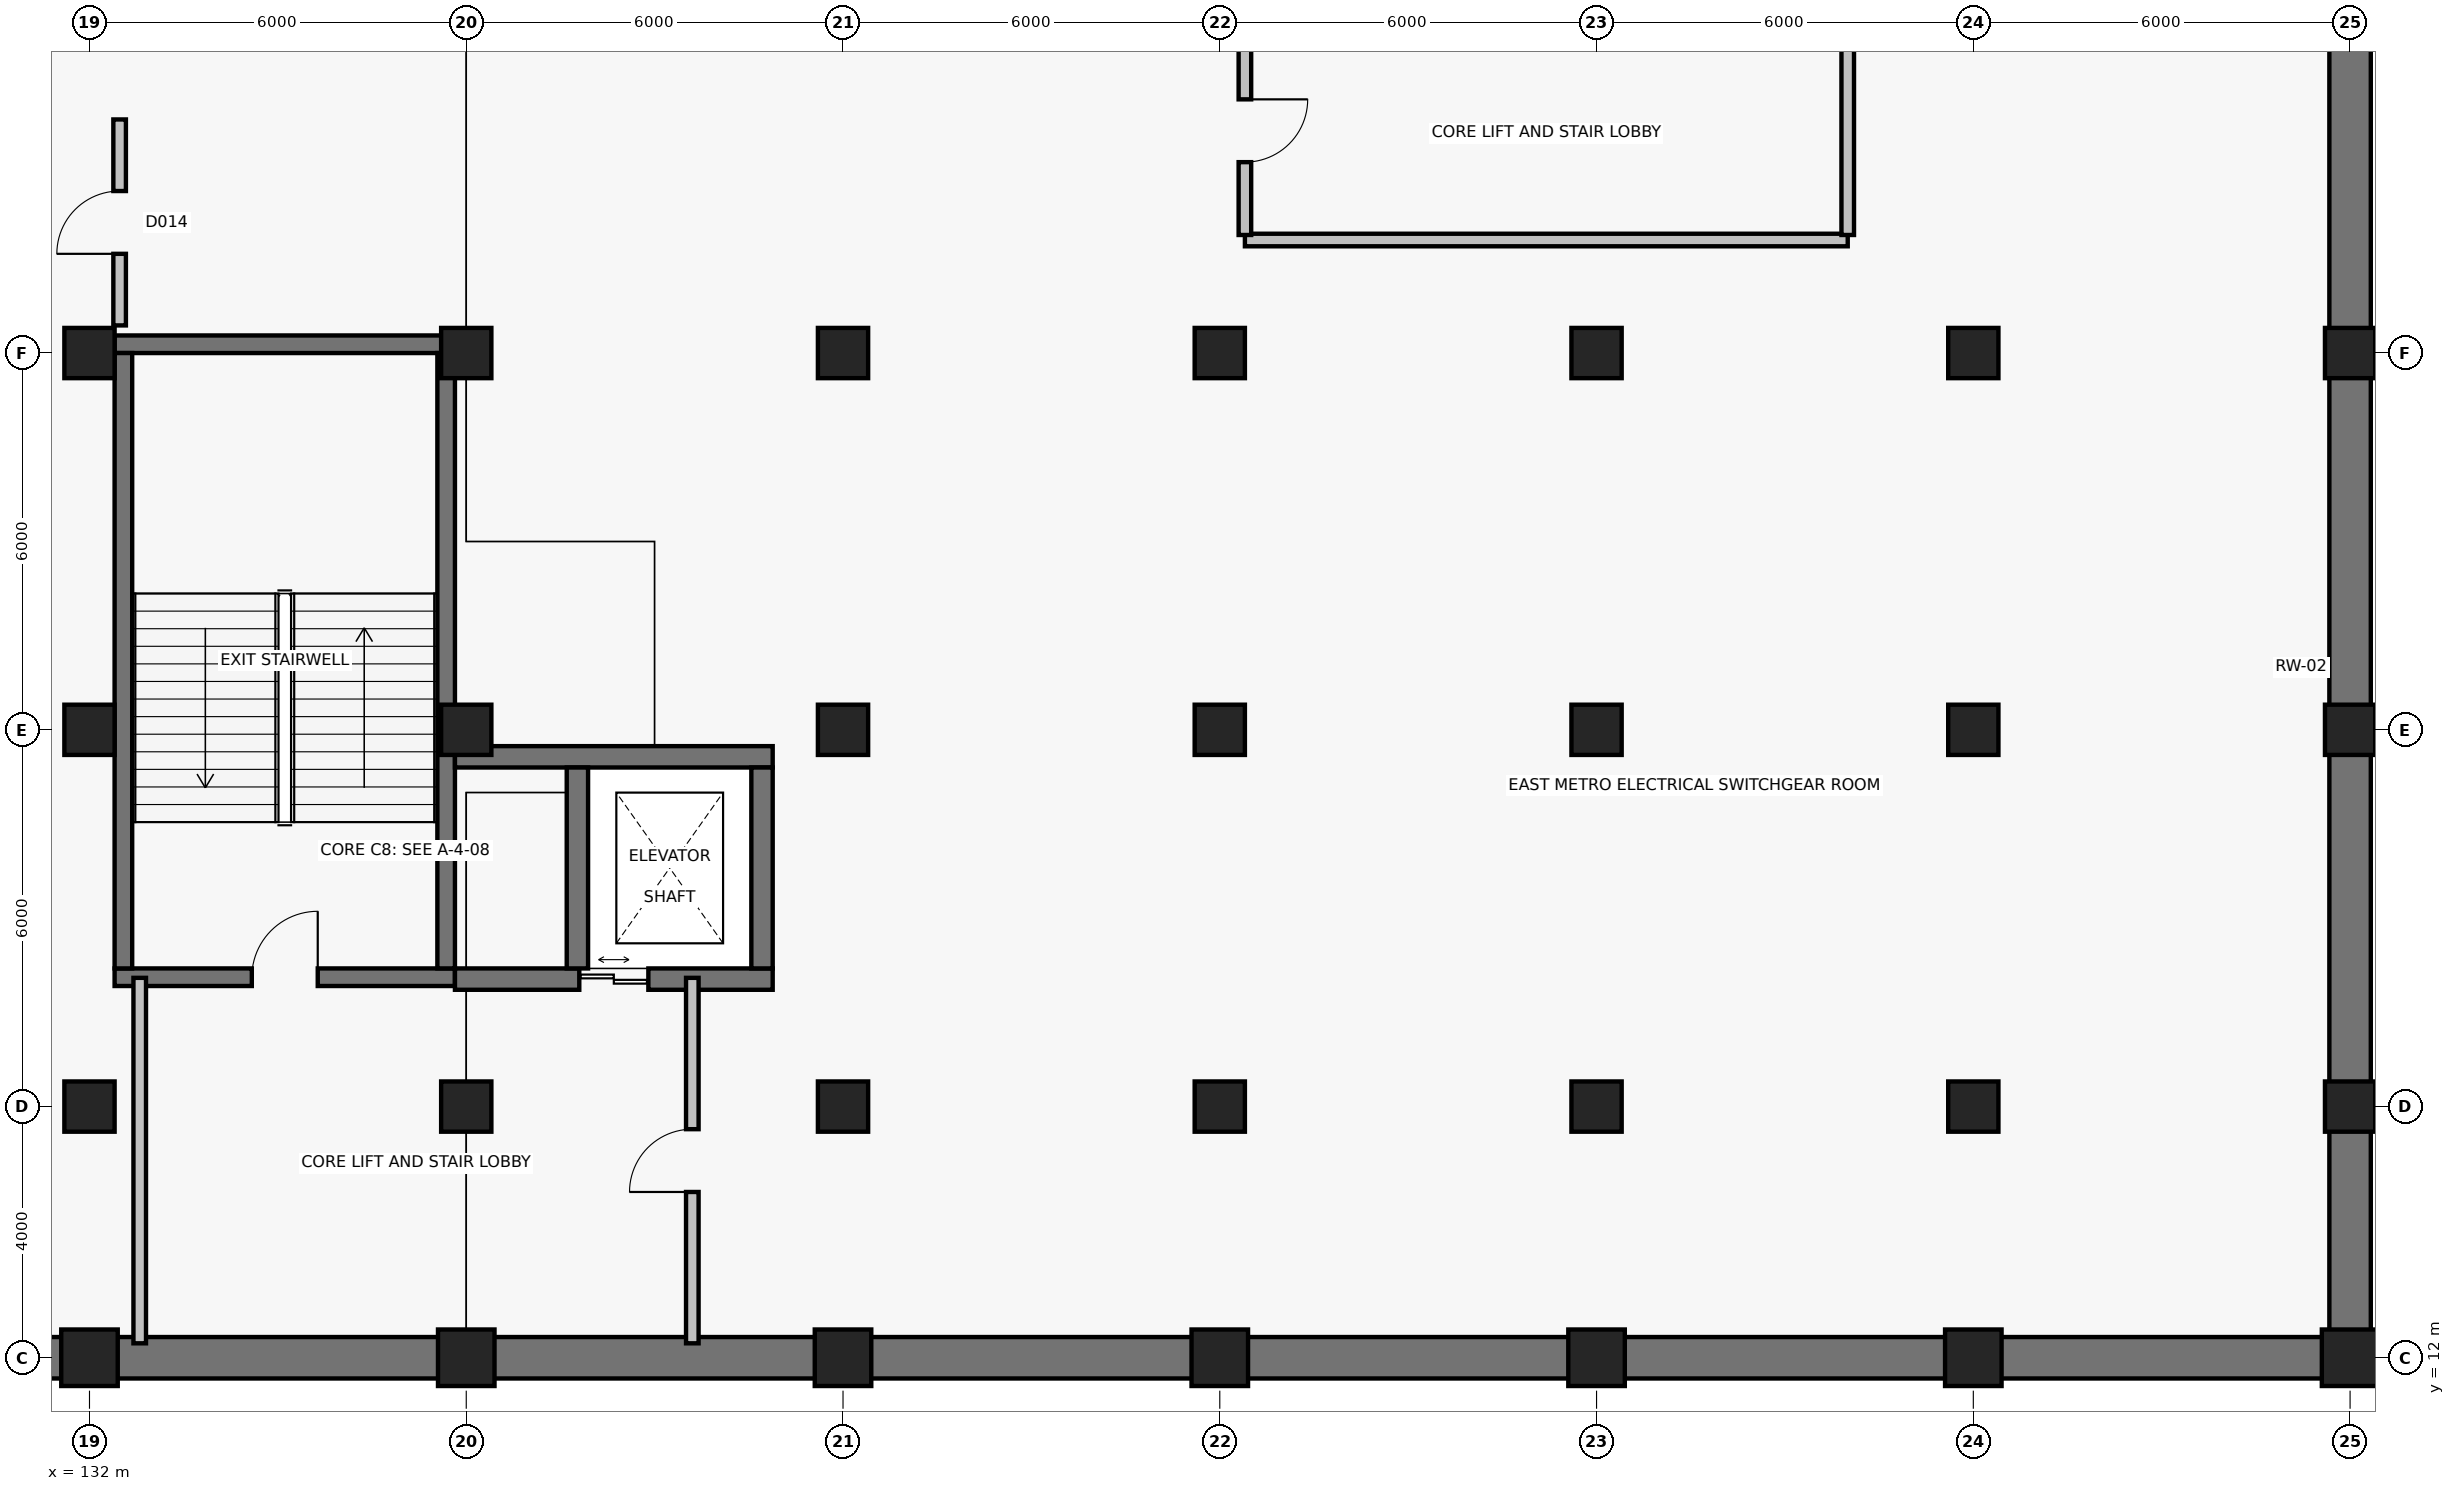
"""IFC4 building model, lengths in metres.
Left out: names, types, materials, properties, quantities, classifications, styles, units other than length and angle.
Written with IfcOpenShell. Run it as: python <this file> out.ifc"""

import sys

from ifc_helpers import new_model, si_unit, direction, frame, frame_2d, origin, origin_2d, place, context, subcontext, project, spatial, rectangle, extrude, element, fill, save


model = new_model("IFC4")
c1 = context("Model", 3, precision=1e-05, world=origin(), true_north=direction((0.0, 1.0)))
c2 = subcontext(c1, "Body", "Model", "MODEL_VIEW")
j1 = project(units=[si_unit("LENGTHUNIT", "METRE"), si_unit("PLANEANGLEUNIT", "RADIAN")], contexts=[c1])
p1 = place(None, origin())
s1 = spatial("IfcSite", under=j1, at=p1, CompositionType="ELEMENT")
p2 = place(p1, origin())
s2 = spatial("IfcBuilding", under=s1, at=p2, CompositionType="ELEMENT")
p3 = place(p2, frame((0.0, 0.0, -4.8)))
s3 = spatial("IfcBuildingStorey", under=s2, at=p3, CompositionType="ELEMENT", Elevation=-4.8)
p4 = place(p3, frame((132.0, 12.0, 0.0), z_axis=(0.0, 0.0, 1.0), x_axis=(1.0, 0.0, 0.0)))
e1 = element("IfcColumn", 1, at=p4, inside=s3, PredefinedType="COLUMN", context=c2, shape_type="SweptSolid", body=[
    extrude(rectangle(XDim=0.9, YDim=0.9, at=origin_2d()), origin(), (0.0, 0.0, 1.0), 4.8),
])
for number, where, z_axis, x_axis in (
    (2, (132.0, 16.0, 0.0), (0.0, 0.0, 1.0), (1.0, 0.0, 0.0)),
    (3, (132.0, 22.0, 0.0), (0.0, 0.0, 1.0), (1.0, 0.0, 0.0)),
    (4, (132.0, 28.0, 0.0), (0.0, 0.0, 1.0), (1.0, 0.0, 0.0)),
):
    element("IfcColumn", number, at=place(p3, frame(where, z_axis=z_axis, x_axis=x_axis)), inside=s3, PredefinedType="COLUMN", context=c2, shape_type="SweptSolid", body=[
        extrude(rectangle(XDim=0.8, YDim=0.8, at=origin_2d()), origin(), (0.0, 0.0, 1.0), 4.8),
    ])
p5 = place(p3, frame((138.0, 12.0, 0.0), z_axis=(0.0, 0.0, 1.0), x_axis=(1.0, 0.0, 0.0)))
e5 = element("IfcColumn", 5, at=p5, inside=s3, PredefinedType="COLUMN", context=c2, shape_type="SweptSolid", body=[
    extrude(rectangle(XDim=0.9, YDim=0.9, at=origin_2d()), origin(), (0.0, 0.0, 1.0), 4.8),
])
for number, where, z_axis, x_axis in (
    (6, (138.0, 16.0, 0.0), (0.0, 0.0, 1.0), (1.0, 0.0, 0.0)),
    (7, (138.0, 22.0, 0.0), (0.0, 0.0, 1.0), (1.0, 0.0, 0.0)),
    (8, (138.0, 28.0, 0.0), (0.0, 0.0, 1.0), (1.0, 0.0, 0.0)),
):
    element("IfcColumn", number, at=place(p3, frame(where, z_axis=z_axis, x_axis=x_axis)), inside=s3, PredefinedType="COLUMN", context=c2, shape_type="SweptSolid", body=[
        extrude(rectangle(XDim=0.8, YDim=0.8, at=origin_2d()), origin(), (0.0, 0.0, 1.0), 4.8),
    ])
p6 = place(p3, frame((144.0, 12.0, 0.0), z_axis=(0.0, 0.0, 1.0), x_axis=(1.0, 0.0, 0.0)))
e9 = element("IfcColumn", 9, at=p6, inside=s3, PredefinedType="COLUMN", context=c2, shape_type="SweptSolid", body=[
    extrude(rectangle(XDim=0.9, YDim=0.9, at=origin_2d()), origin(), (0.0, 0.0, 1.0), 4.8),
])
for number, where, z_axis, x_axis in (
    (10, (144.0, 16.0, 0.0), (0.0, 0.0, 1.0), (1.0, 0.0, 0.0)),
    (11, (144.0, 22.0, 0.0), (0.0, 0.0, 1.0), (1.0, 0.0, 0.0)),
    (12, (144.0, 28.0, 0.0), (0.0, 0.0, 1.0), (1.0, 0.0, 0.0)),
):
    element("IfcColumn", number, at=place(p3, frame(where, z_axis=z_axis, x_axis=x_axis)), inside=s3, PredefinedType="COLUMN", context=c2, shape_type="SweptSolid", body=[
        extrude(rectangle(XDim=0.8, YDim=0.8, at=origin_2d()), origin(), (0.0, 0.0, 1.0), 4.8),
    ])
p7 = place(p3, frame((150.0, 12.0, 0.0), z_axis=(0.0, 0.0, 1.0), x_axis=(1.0, 0.0, 0.0)))
e13 = element("IfcColumn", 13, at=p7, inside=s3, PredefinedType="COLUMN", context=c2, shape_type="SweptSolid", body=[
    extrude(rectangle(XDim=0.9, YDim=0.9, at=origin_2d()), origin(), (0.0, 0.0, 1.0), 4.8),
])
for number, where, z_axis, x_axis in (
    (14, (150.0, 16.0, 0.0), (0.0, 0.0, 1.0), (1.0, 0.0, 0.0)),
    (15, (150.0, 22.0, 0.0), (0.0, 0.0, 1.0), (1.0, 0.0, 0.0)),
    (16, (150.0, 28.0, 0.0), (0.0, 0.0, 1.0), (1.0, 0.0, 0.0)),
):
    element("IfcColumn", number, at=place(p3, frame(where, z_axis=z_axis, x_axis=x_axis)), inside=s3, PredefinedType="COLUMN", context=c2, shape_type="SweptSolid", body=[
        extrude(rectangle(XDim=0.8, YDim=0.8, at=origin_2d()), origin(), (0.0, 0.0, 1.0), 4.8),
    ])
p8 = place(p3, frame((156.0, 12.0, 0.0), z_axis=(0.0, 0.0, 1.0), x_axis=(1.0, 0.0, 0.0)))
e17 = element("IfcColumn", 17, at=p8, inside=s3, PredefinedType="COLUMN", context=c2, shape_type="SweptSolid", body=[
    extrude(rectangle(XDim=0.9, YDim=0.9, at=origin_2d()), origin(), (0.0, 0.0, 1.0), 4.8),
])
for number, where, z_axis, x_axis in (
    (18, (156.0, 16.0, 0.0), (0.0, 0.0, 1.0), (1.0, 0.0, 0.0)),
    (19, (156.0, 22.0, 0.0), (0.0, 0.0, 1.0), (1.0, 0.0, 0.0)),
    (20, (156.0, 28.0, 0.0), (0.0, 0.0, 1.0), (1.0, 0.0, 0.0)),
):
    element("IfcColumn", number, at=place(p3, frame(where, z_axis=z_axis, x_axis=x_axis)), inside=s3, PredefinedType="COLUMN", context=c2, shape_type="SweptSolid", body=[
        extrude(rectangle(XDim=0.8, YDim=0.8, at=origin_2d()), origin(), (0.0, 0.0, 1.0), 4.8),
    ])
p9 = place(p3, frame((162.0, 12.0, 0.0), z_axis=(0.0, 0.0, 1.0), x_axis=(1.0, 0.0, 0.0)))
e21 = element("IfcColumn", 21, at=p9, inside=s3, PredefinedType="COLUMN", context=c2, shape_type="SweptSolid", body=[
    extrude(rectangle(XDim=0.9, YDim=0.9, at=origin_2d()), origin(), (0.0, 0.0, 1.0), 4.8),
])
for number, where, z_axis, x_axis in (
    (22, (162.0, 16.0, 0.0), (0.0, 0.0, 1.0), (1.0, 0.0, 0.0)),
    (23, (162.0, 22.0, 0.0), (0.0, 0.0, 1.0), (1.0, 0.0, 0.0)),
    (24, (162.0, 28.0, 0.0), (0.0, 0.0, 1.0), (1.0, 0.0, 0.0)),
):
    element("IfcColumn", number, at=place(p3, frame(where, z_axis=z_axis, x_axis=x_axis)), inside=s3, PredefinedType="COLUMN", context=c2, shape_type="SweptSolid", body=[
        extrude(rectangle(XDim=0.8, YDim=0.8, at=origin_2d()), origin(), (0.0, 0.0, 1.0), 4.8),
    ])
p10 = place(p3, frame((168.0, 12.0, 0.0), z_axis=(0.0, 0.0, 1.0), x_axis=(1.0, 0.0, 0.0)))
e25 = element("IfcColumn", 25, at=p10, inside=s3, PredefinedType="COLUMN", context=c2, shape_type="SweptSolid", body=[
    extrude(rectangle(XDim=0.9, YDim=0.9, at=origin_2d()), origin(), (0.0, 0.0, 1.0), 4.8),
])
for number, where, z_axis, x_axis in (
    (26, (168.0, 16.0, 0.0), (0.0, 0.0, 1.0), (1.0, 0.0, 0.0)),
    (27, (168.0, 22.0, 0.0), (0.0, 0.0, 1.0), (1.0, 0.0, 0.0)),
    (28, (168.0, 28.0, 0.0), (0.0, 0.0, 1.0), (1.0, 0.0, 0.0)),
):
    element("IfcColumn", number, at=place(p3, frame(where, z_axis=z_axis, x_axis=x_axis)), inside=s3, PredefinedType="COLUMN", context=c2, shape_type="SweptSolid", body=[
        extrude(rectangle(XDim=0.8, YDim=0.8, at=origin_2d()), origin(), (0.0, 0.0, 1.0), 4.8),
    ])
for number, where, z_axis, x_axis in (
    (29, (108.0, 12.0, 0.0), (0.0, 0.0, 1.0), (1.0, 0.0, 0.0)),
    (30, (138.0, 12.0, 0.0), (0.0, 0.0, 1.0), (1.0, 0.0, 0.0)),
):
    element("IfcWall", number, at=place(p3, frame(where, z_axis=z_axis, x_axis=x_axis)), inside=s3, PredefinedType="USERDEFINED", context=c2, shape_type="SweptSolid", body=[
        extrude(rectangle(XDim=30.0, YDim=0.66, at=frame_2d((15.0, 0.0))), origin(), (0.0, 0.0, 1.0), 4.4),
    ])
p11 = place(p3, frame((168.0, 12.0, 0.0), z_axis=(0.0, 0.0, 1.0), x_axis=(0.0, 1.0, 0.0)))
e31 = element("IfcWall", 31, at=p11, inside=s3, PredefinedType="USERDEFINED", context=c2, shape_type="SweptSolid", body=[
    extrude(rectangle(XDim=22.0, YDim=0.66, at=frame_2d((11.0, 0.0))), origin(), (0.0, 0.0, 1.0), 4.4),
])
p12 = place(p3, frame((132.4, 18.06, 0.0), z_axis=(0.0, 0.0, 1.0), x_axis=(1.0, 0.0, 0.0)))
e32 = element("IfcWall", 32, at=p12, inside=s3, PredefinedType="SHEAR", context=c2, shape_type="SweptSolid", body=[
    extrude(rectangle(XDim=5.42, YDim=0.28, at=frame_2d((2.71, 0.0))), origin(), (0.0, 0.0, 1.0), 4.4),
])
p13 = place(p12, frame((2.185, 0.0, 0.0)))
e33 = element("IfcOpeningElement", 33, at=p13, cuts=e32, PredefinedType="OPENING", context=c2, shape_type="SweptSolid", body=[
    extrude(rectangle(XDim=1.05, YDim=2.15, at=frame_2d((0.525, 1.075))), frame((0.0, 0.155, 0.0), z_axis=(0.0, -1.0, 0.0), x_axis=(1.0, 0.0, 0.0)), (0.0, 0.0, 1.0), 0.31),
])
p14 = place(p3, frame((137.82, 28.14, 0.0), z_axis=(0.0, 0.0, 1.0), x_axis=(-1.0, 0.0, 0.0)))
e34 = element("IfcWall", 34, at=p14, inside=s3, PredefinedType="SHEAR", context=c2, shape_type="SweptSolid", body=[
    extrude(rectangle(XDim=5.42, YDim=0.28, at=frame_2d((2.71, 0.0))), origin(), (0.0, 0.0, 1.0), 4.4),
])
for number, where, z_axis, x_axis in (
    (35, (132.54, 28.0, 0.0), (0.0, 0.0, 1.0), (0.0, -1.0, 0.0)),
    (36, (137.68, 18.2, 0.0), (0.0, 0.0, 1.0), (0.0, 1.0, 0.0)),
):
    element("IfcWall", number, at=place(p3, frame(where, z_axis=z_axis, x_axis=x_axis)), inside=s3, PredefinedType="SHEAR", context=c2, shape_type="SweptSolid", body=[
        extrude(rectangle(XDim=9.8, YDim=0.28, at=frame_2d((4.9, 0.0))), origin(), (0.0, 0.0, 1.0), 4.4),
    ])
p15 = place(p3, frame((137.82, 18.03, 0.0), z_axis=(0.0, 0.0, 1.0), x_axis=(1.0, 0.0, 0.0)))
e37 = element("IfcWall", 37, at=p15, inside=s3, PredefinedType="SHEAR", context=c2, shape_type="SweptSolid", body=[
    extrude(rectangle(XDim=5.06, YDim=0.34, at=frame_2d((2.53, 0.0))), origin(), (0.0, 0.0, 1.0), 4.4),
])
p16 = place(p15, frame((1.98, 0.0, 0.0)))
e38 = element("IfcOpeningElement", 38, at=p16, cuts=e37, PredefinedType="OPENING", context=c2, shape_type="SweptSolid", body=[
    extrude(rectangle(XDim=1.1, YDim=2.2, at=frame_2d((0.55, 1.1))), frame((0.0, 0.185, 0.0), z_axis=(0.0, -1.0, 0.0), x_axis=(1.0, 0.0, 0.0)), (0.0, 0.0, 1.0), 0.37),
])
p17 = place(p3, frame((142.88, 21.57, 0.0), z_axis=(0.0, 0.0, 1.0), x_axis=(-1.0, 0.0, 0.0)))
e39 = element("IfcWall", 39, at=p17, inside=s3, PredefinedType="SHEAR", context=c2, shape_type="SweptSolid", body=[
    extrude(rectangle(XDim=5.06, YDim=0.34, at=frame_2d((2.53, 0.0))), origin(), (0.0, 0.0, 1.0), 4.4),
])
for number, where, z_axis, x_axis in (
    (40, (139.77, 21.4, 0.0), (0.0, 0.0, 1.0), (0.0, -1.0, 0.0)),
    (41, (142.71, 18.2, 0.0), (0.0, 0.0, 1.0), (0.0, 1.0, 0.0)),
):
    element("IfcWall", number, at=place(p3, frame(where, z_axis=z_axis, x_axis=x_axis)), inside=s3, PredefinedType="SHEAR", context=c2, shape_type="SweptSolid", body=[
        extrude(rectangle(XDim=3.2, YDim=0.34, at=frame_2d((1.6, 0.0))), origin(), (0.0, 0.0, 1.0), 4.4),
    ])
p18 = place(p3, frame((132.8, 18.05, 0.0), z_axis=(0.0, 0.0, 1.0), x_axis=(0.0, -1.0, 0.0)))
e42 = element("IfcWall", 42, at=p18, inside=s3, PredefinedType="PARTITIONING", context=c2, shape_type="SweptSolid", body=[
    extrude(rectangle(XDim=5.82, YDim=0.2, at=frame_2d((2.91, 0.0))), origin(), (0.0, 0.0, 1.0), 3.741),
])
p19 = place(p3, frame((141.6, 12.23, 0.0), z_axis=(0.0, 0.0, 1.0), x_axis=(0.0, 1.0, 0.0)))
e43 = element("IfcWall", 43, at=p19, inside=s3, PredefinedType="PARTITIONING", context=c2, shape_type="SweptSolid", body=[
    extrude(rectangle(XDim=5.82, YDim=0.2, at=frame_2d((2.91, 0.0))), origin(), (0.0, 0.0, 1.0), 3.817),
])
p20 = place(p19, frame((2.41, 0.0, 0.0)))
e44 = element("IfcOpeningElement", 44, at=p20, cuts=e43, PredefinedType="OPENING", context=c2, shape_type="SweptSolid", body=[
    extrude(rectangle(XDim=1.0, YDim=2.15, at=frame_2d((0.5, 1.075))), frame((0.0, 0.115, 0.0), z_axis=(0.0, -1.0, 0.0), x_axis=(1.0, 0.0, 0.0)), (0.0, 0.0, 1.0), 0.23),
])
p21 = place(p3, frame((150.4, 29.8, 0.0), z_axis=(0.0, 0.0, 1.0), x_axis=(1.0, 0.0, 0.0)))
e45 = element("IfcWall", 45, at=p21, inside=s3, PredefinedType="PARTITIONING", context=c2, shape_type="SweptSolid", body=[
    extrude(rectangle(XDim=9.6, YDim=0.2, at=frame_2d((4.8, 0.0))), origin(), (0.0, 0.0, 1.0), 3.741),
])
p22 = place(p3, frame((150.4, 33.2, 0.0), z_axis=(0.0, 0.0, 1.0), x_axis=(0.0, -1.0, 0.0)))
e46 = element("IfcWall", 46, at=p22, inside=s3, PredefinedType="PARTITIONING", context=c2, shape_type="SweptSolid", body=[
    extrude(rectangle(XDim=3.32, YDim=0.2, at=frame_2d((1.66, 0.0))), origin(), (0.0, 0.0, 1.0), 3.741),
])
p23 = place(p22, frame((1.16, 0.0, 0.0)))
e47 = element("IfcOpeningElement", 47, at=p23, cuts=e46, PredefinedType="OPENING", context=c2, shape_type="SweptSolid", body=[
    extrude(rectangle(XDim=1.0, YDim=2.15, at=frame_2d((0.5, 1.075))), frame((0.0, 0.115, 0.0), z_axis=(0.0, -1.0, 0.0), x_axis=(1.0, 0.0, 0.0)), (0.0, 0.0, 1.0), 0.23),
])
p24 = place(p3, frame((160.0, 29.88, 0.0), z_axis=(0.0, 0.0, 1.0), x_axis=(0.0, 1.0, 0.0)))
e48 = element("IfcWall", 48, at=p24, inside=s3, PredefinedType="PARTITIONING", context=c2, shape_type="SweptSolid", body=[
    extrude(rectangle(XDim=3.32, YDim=0.2, at=frame_2d((1.66, 0.0))), origin(), (0.0, 0.0, 1.0), 4.4),
])
p25 = place(p3, frame((132.48, 28.44, 0.0), z_axis=(0.0, 0.0, 1.0), x_axis=(0.0, 1.0, 0.0)))
e49 = element("IfcWall", 49, at=p25, inside=s3, PredefinedType="PARTITIONING", context=c2, shape_type="SweptSolid", body=[
    extrude(rectangle(XDim=3.28, YDim=0.2, at=frame_2d((1.64, 0.0))), origin(), (0.0, 0.0, 1.0), 4.4),
])
p26 = place(p25, frame((1.14, 0.0, 0.0)))
e50 = element("IfcOpeningElement", 50, at=p26, cuts=e49, PredefinedType="OPENING", context=c2, shape_type="SweptSolid", body=[
    extrude(rectangle(XDim=1.0, YDim=2.15, at=frame_2d((0.5, 1.075))), frame((0.0, 0.115, 0.0), z_axis=(0.0, -1.0, 0.0), x_axis=(1.0, 0.0, 0.0)), (0.0, 0.0, 1.0), 0.23),
])
p27 = place(p13, origin())
e51 = element("IfcDoor", 51, at=p27, inside=s3, OperationType="SINGLE_SWING_RIGHT", PredefinedType="DOOR", context=c2, shape_type="SweptSolid", body=[
    extrude(rectangle(XDim=1.05, YDim=2.15, at=frame_2d((0.525, 1.075))), frame((0.0, 0.025, 0.0), z_axis=(0.0, -1.0, 0.0), x_axis=(1.0, 0.0, 0.0)), (0.0, 0.0, 1.0), 0.05),
])
fill(e33, e51)
p28 = place(p16, origin())
e52 = element("IfcDoor", 52, at=p28, inside=s3, OperationType="DOUBLE_DOOR_SLIDING", PredefinedType="DOOR", context=c2, shape_type="SweptSolid", body=[
    extrude(rectangle(XDim=1.1, YDim=2.2, at=frame_2d((0.55, 1.1))), frame((0.0, 0.025, 0.0), z_axis=(0.0, -1.0, 0.0), x_axis=(1.0, 0.0, 0.0)), (0.0, 0.0, 1.0), 0.05),
])
fill(e38, e52)
p29 = place(p20, origin())
e53 = element("IfcDoor", 53, at=p29, inside=s3, OperationType="SINGLE_SWING_LEFT", PredefinedType="DOOR", context=c2, shape_type="SweptSolid", body=[
    extrude(rectangle(XDim=1.0, YDim=2.15, at=frame_2d((0.5, 1.075))), frame((0.0, 0.025, 0.0), z_axis=(0.0, -1.0, 0.0), x_axis=(1.0, 0.0, 0.0)), (0.0, 0.0, 1.0), 0.05),
])
fill(e44, e53)
p30 = place(p23, origin())
e54 = element("IfcDoor", 54, at=p30, inside=s3, OperationType="SINGLE_SWING_LEFT", PredefinedType="DOOR", context=c2, shape_type="SweptSolid", body=[
    extrude(rectangle(XDim=1.0, YDim=2.15, at=frame_2d((0.5, 1.075))), frame((0.0, 0.025, 0.0), z_axis=(0.0, -1.0, 0.0), x_axis=(1.0, 0.0, 0.0)), (0.0, 0.0, 1.0), 0.05),
])
fill(e47, e54)
p31 = place(p26, origin())
e55 = element("IfcDoor", 55, at=p31, inside=s3, OperationType="SINGLE_SWING_LEFT", PredefinedType="DOOR", context=c2, shape_type="SweptSolid", body=[
    extrude(rectangle(XDim=1.0, YDim=2.15, at=frame_2d((0.5, 1.075))), frame((0.0, 0.025, 0.0), z_axis=(0.0, -1.0, 0.0), x_axis=(1.0, 0.0, 0.0)), (0.0, 0.0, 1.0), 0.05),
])
fill(e50, e55)
save(model, sys.argv[1])
